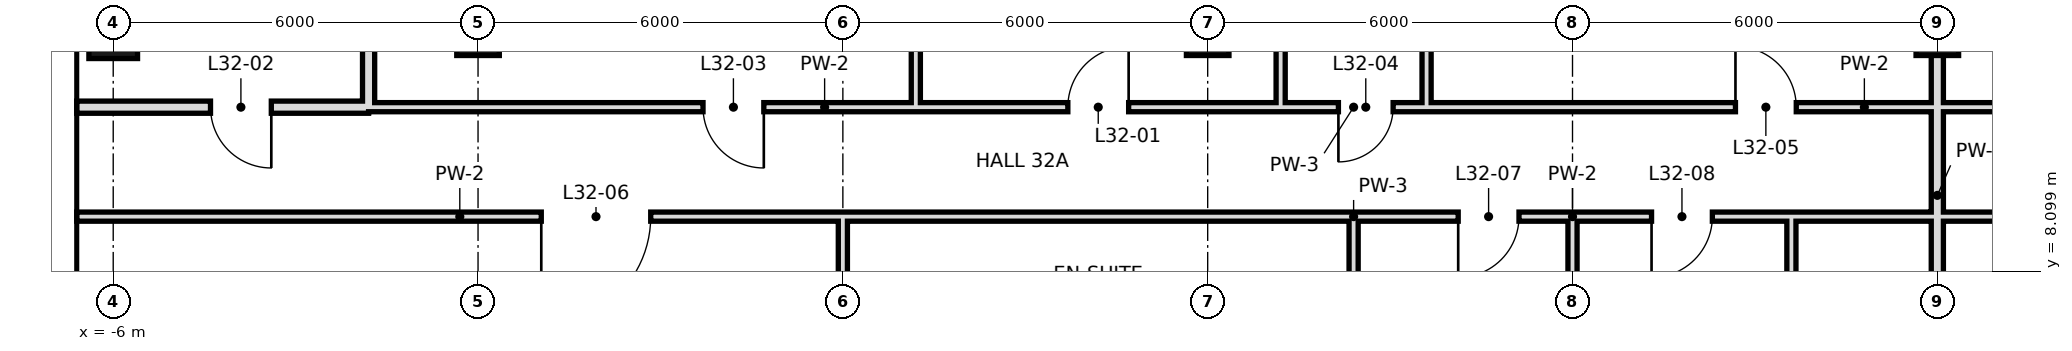
"""IFC4 building model, lengths in metres.
Left out: names, types, materials, properties, quantities, classifications, styles, units other than length and angle.
Written with IfcOpenShell. Run it as: python <this file> out.ifc"""

import sys

from ifc_helpers import new_model, si_unit, direction, frame, frame_2d, origin, origin_2d, place, context, subcontext, project, spatial, rectangle, hollow_rectangle, extrude, element, fill, save


model = new_model("IFC4")
c1 = context("Model", 3, precision=1e-05, world=origin(), true_north=direction((0.0, 1.0)))
c2 = subcontext(c1, "Body", "Model", "MODEL_VIEW")
j1 = project(units=[si_unit("LENGTHUNIT", "METRE"), si_unit("PLANEANGLEUNIT", "RADIAN")], contexts=[c1])
p1 = place(None, origin())
s1 = spatial("IfcSite", under=j1, at=p1, CompositionType="ELEMENT")
p2 = place(p1, origin())
s2 = spatial("IfcBuilding", under=s1, at=p2, CompositionType="ELEMENT")
p3 = place(p2, frame((0.0, 0.0, 143.8)))
s3 = spatial("IfcBuildingStorey", under=s2, at=p3, CompositionType="ELEMENT", Elevation=143.8)
p4 = place(p3, frame((-6.0, 12.0, 0.0), z_axis=(0.0, 0.0, 1.0), x_axis=(1.0, 0.0, 0.0)))
e1 = element("IfcColumn", 1, at=p4, inside=s3, PredefinedType="COLUMN", context=c2, shape_type="SweptSolid", body=[
    extrude(hollow_rectangle(XDim=0.8, YDim=0.8, WallThickness=0.04, at=origin_2d()), origin(), (0.0, 0.0, 1.0), 3.6),
])
for number, where, z_axis, x_axis in (
    (2, (0.0, 12.0, 0.0), (0.0, 0.0, 1.0), (1.0, 0.0, 0.0)),
    (3, (12.0, 12.0, 0.0), (0.0, 0.0, 1.0), (1.0, 0.0, 0.0)),
    (4, (24.0, 12.0, 0.0), (0.0, 0.0, 1.0), (1.0, 0.0, 0.0)),
):
    element("IfcColumn", number, at=place(p3, frame(where, z_axis=z_axis, x_axis=x_axis)), inside=s3, PredefinedType="COLUMN", context=c2, shape_type="SweptSolid", body=[
        extrude(hollow_rectangle(XDim=0.7, YDim=0.7, WallThickness=0.036, at=origin_2d()), origin(), (0.0, 0.0, 1.0), 3.6),
    ])
p5 = place(p3, frame((-1.8, 10.8, 0.0), z_axis=(0.0, 0.0, 1.0), x_axis=(0.0, 1.0, 0.0)))
e5 = element("IfcWall", 5, at=p5, inside=s3, PredefinedType="SOLIDWALL", context=c2, shape_type="SweptSolid", body=[
    extrude(rectangle(XDim=7.2, YDim=0.2, at=frame_2d((3.6, 0.0))), origin(), (0.0, 0.0, 1.0), 3.42),
])
p6 = place(p3, frame((13.2, 10.8, 0.0), z_axis=(0.0, 0.0, 1.0), x_axis=(0.0, 1.0, 0.0)))
e6 = element("IfcWall", 6, at=p6, inside=s3, PredefinedType="PARTITIONING", context=c2, shape_type="SweptSolid", body=[
    extrude(rectangle(XDim=7.9, YDim=0.15, at=frame_2d((3.95, 0.0))), origin(), (0.0, 0.0, 1.0), 3.42),
])
p7 = place(p3, frame((14.4, 6.0, 0.0), z_axis=(0.0, 0.0, 1.0), x_axis=(0.0, 1.0, 0.0)))
e7 = element("IfcWall", 7, at=p7, inside=s3, PredefinedType="PARTITIONING", context=c2, shape_type="SweptSolid", body=[
    extrude(rectangle(XDim=3.0, YDim=0.15, at=frame_2d((1.5, 0.0))), origin(), (0.0, 0.0, 1.0), 3.42),
])
p8 = place(p3, frame((15.6, 10.8, 0.0), z_axis=(0.0, 0.0, 1.0), x_axis=(0.0, 1.0, 0.0)))
e8 = element("IfcWall", 8, at=p8, inside=s3, PredefinedType="PARTITIONING", context=c2, shape_type="SweptSolid", body=[
    extrude(rectangle(XDim=7.9, YDim=0.15, at=frame_2d((3.95, 0.0))), origin(), (0.0, 0.0, 1.0), 3.42),
])
p9 = place(p3, frame((18.0, -0.6, 0.0), z_axis=(0.0, 0.0, 1.0), x_axis=(0.0, 1.0, 0.0)))
e9 = element("IfcWall", 9, at=p9, inside=s3, PredefinedType="PARTITIONING", context=c2, shape_type="SweptSolid", body=[
    extrude(rectangle(XDim=9.6, YDim=0.15, at=frame_2d((4.8, 0.0))), origin(), (0.0, 0.0, 1.0), 2.72),
])
p10 = place(p3, frame((21.6, 6.0, 0.0), z_axis=(0.0, 0.0, 1.0), x_axis=(0.0, 1.0, 0.0)))
e10 = element("IfcWall", 10, at=p10, inside=s3, PredefinedType="PARTITIONING", context=c2, shape_type="SweptSolid", body=[
    extrude(rectangle(XDim=3.0, YDim=0.15, at=frame_2d((1.5, 0.0))), origin(), (0.0, 0.0, 1.0), 3.42),
])
p11 = place(p3, frame((24.0, 0.0, 0.0), z_axis=(0.0, 0.0, 1.0), x_axis=(0.0, 1.0, 0.0)))
e11 = element("IfcWall", 11, at=p11, inside=s3, PredefinedType="SOLIDWALL", context=c2, shape_type="SweptSolid", body=[
    extrude(rectangle(XDim=18.7, YDim=0.2, at=frame_2d((9.35, 0.0))), origin(), (0.0, 0.0, 1.0), 2.72),
])
p12 = place(p3, frame((6.0, 6.0, 0.0), z_axis=(0.0, 0.0, 1.0), x_axis=(0.0, 1.0, 0.0)))
e12 = element("IfcWall", 12, at=p12, inside=s3, PredefinedType="PARTITIONING", context=c2, shape_type="SweptSolid", body=[
    extrude(rectangle(XDim=3.0, YDim=0.15, at=frame_2d((1.5, 0.0))), origin(), (0.0, 0.0, 1.0), 2.72),
])
p13 = place(p3, frame((7.2, 10.8, 0.0), z_axis=(0.0, 0.0, 1.0), x_axis=(0.0, 1.0, 0.0)))
e13 = element("IfcWall", 13, at=p13, inside=s3, PredefinedType="PARTITIONING", context=c2, shape_type="SweptSolid", body=[
    extrude(rectangle(XDim=7.9, YDim=0.15, at=frame_2d((3.95, 0.0))), origin(), (0.0, 0.0, 1.0), 3.42),
])
p14 = place(p3, frame((-6.6, 10.8, 0.0), z_axis=(0.0, 0.0, 1.0), x_axis=(1.0, 0.0, 0.0)))
e14 = element("IfcWall", 14, at=p14, inside=s3, PredefinedType="SOLIDWALL", context=c2, shape_type="SweptSolid", body=[
    extrude(rectangle(XDim=4.8, YDim=0.2, at=frame_2d((2.4, 0.0))), origin(), (0.0, 0.0, 1.0), 2.97),
])
p15 = place(p14, frame((2.2, 0.0, 0.0)))
e15 = element("IfcOpeningElement", 15, at=p15, cuts=e14, PredefinedType="OPENING", context=c2, shape_type="SweptSolid", body=[
    extrude(rectangle(XDim=1.0, YDim=2.4, at=frame_2d((0.5, 1.2))), frame((0.0, 0.11, 0.0), z_axis=(0.0, -1.0, 0.0), x_axis=(1.0, 0.0, 0.0)), (0.0, 0.0, 1.0), 0.22),
])
p16 = place(p3, frame((-1.8, 10.8, 0.0), z_axis=(0.0, 0.0, 1.0), x_axis=(1.0, 0.0, 0.0)))
e16 = element("IfcWall", 16, at=p16, inside=s3, PredefinedType="PARTITIONING", context=c2, shape_type="SweptSolid", body=[
    extrude(rectangle(XDim=15.0, YDim=0.15, at=frame_2d((7.5, 0.0))), origin(), (0.0, 0.0, 1.0), 3.42),
])
p17 = place(p16, frame((11.5, 0.0, 0.0)))
e17 = element("IfcOpeningElement", 17, at=p17, cuts=e16, PredefinedType="OPENING", context=c2, shape_type="SweptSolid", body=[
    extrude(rectangle(XDim=1.0, YDim=2.4, at=frame_2d((0.5, 1.2))), frame((0.0, 0.085, 0.0), z_axis=(0.0, -1.0, 0.0), x_axis=(1.0, 0.0, 0.0)), (0.0, 0.0, 1.0), 0.17),
])
p18 = place(p16, frame((5.5, 0.0, 0.0)))
e18 = element("IfcOpeningElement", 18, at=p18, cuts=e16, PredefinedType="OPENING", context=c2, shape_type="SweptSolid", body=[
    extrude(rectangle(XDim=1.0, YDim=2.4, at=frame_2d((0.5, 1.2))), frame((0.0, 0.085, 0.0), z_axis=(0.0, -1.0, 0.0), x_axis=(1.0, 0.0, 0.0)), (0.0, 0.0, 1.0), 0.17),
])
p19 = place(p3, frame((15.6, 10.8, 0.0), z_axis=(0.0, 0.0, 1.0), x_axis=(1.0, 0.0, 0.0)))
e19 = element("IfcWall", 19, at=p19, inside=s3, PredefinedType="PARTITIONING", context=c2, shape_type="SweptSolid", body=[
    extrude(rectangle(XDim=14.4, YDim=0.15, at=frame_2d((7.2, 0.0))), origin(), (0.0, 0.0, 1.0), 3.42),
])
p20 = place(p19, frame((5.08, 0.0, 0.0)))
e20 = element("IfcOpeningElement", 20, at=p20, cuts=e19, PredefinedType="OPENING", context=c2, shape_type="SweptSolid", body=[
    extrude(rectangle(XDim=1.0, YDim=2.4, at=frame_2d((0.5, 1.2))), frame((0.0, 0.085, 0.0), z_axis=(0.0, -1.0, 0.0), x_axis=(1.0, 0.0, 0.0)), (0.0, 0.0, 1.0), 0.17),
])
p21 = place(p19, frame((10.9, 0.0, 0.0)))
e21 = element("IfcOpeningElement", 21, at=p21, cuts=e19, PredefinedType="OPENING", context=c2, shape_type="SweptSolid", body=[
    extrude(rectangle(XDim=1.0, YDim=2.4, at=frame_2d((0.5, 1.2))), frame((0.0, 0.085, 0.0), z_axis=(0.0, -1.0, 0.0), x_axis=(1.0, 0.0, 0.0)), (0.0, 0.0, 1.0), 0.17),
])
p22 = place(p3, frame((13.2, 10.8, 0.0), z_axis=(0.0, 0.0, 1.0), x_axis=(1.0, 0.0, 0.0)))
e22 = element("IfcWall", 22, at=p22, inside=s3, PredefinedType="PARTITIONING", context=c2, shape_type="SweptSolid", body=[
    extrude(rectangle(XDim=2.4, YDim=0.15, at=frame_2d((1.2, 0.0))), origin(), (0.0, 0.0, 1.0), 3.42),
])
p23 = place(p22, frame((0.95, 0.0, 0.0)))
e23 = element("IfcOpeningElement", 23, at=p23, cuts=e22, PredefinedType="OPENING", context=c2, shape_type="SweptSolid", body=[
    extrude(rectangle(XDim=0.9, YDim=2.4, at=frame_2d((0.45, 1.2))), frame((0.0, 0.085, 0.0), z_axis=(0.0, -1.0, 0.0), x_axis=(1.0, 0.0, 0.0)), (0.0, 0.0, 1.0), 0.17),
])
p24 = place(p3, frame((-6.6, 9.0, 0.0), z_axis=(0.0, 0.0, 1.0), x_axis=(1.0, 0.0, 0.0)))
e24 = element("IfcWall", 24, at=p24, inside=s3, PredefinedType="PARTITIONING", context=c2, shape_type="SweptSolid", body=[
    extrude(rectangle(XDim=12.6, YDim=0.15, at=frame_2d((6.3, 0.0))), origin(), (0.0, 0.0, 1.0), 3.42),
])
p25 = place(p24, frame((7.64, 0.0, 0.0)))
e25 = element("IfcOpeningElement", 25, at=p25, cuts=e24, PredefinedType="OPENING", context=c2, shape_type="SweptSolid", body=[
    extrude(rectangle(XDim=1.8, YDim=2.4, at=frame_2d((0.9, 1.2))), frame((0.0, 0.085, 0.0), z_axis=(0.0, -1.0, 0.0), x_axis=(1.0, 0.0, 0.0)), (0.0, 0.0, 1.0), 0.17),
])
p26 = place(p3, frame((14.4, 9.0, 0.0), z_axis=(0.0, 0.0, 1.0), x_axis=(1.0, 0.0, 0.0)))
e26 = element("IfcWall", 26, at=p26, inside=s3, PredefinedType="PARTITIONING", context=c2, shape_type="SweptSolid", body=[
    extrude(rectangle(XDim=7.2, YDim=0.15, at=frame_2d((3.6, 0.0))), origin(), (0.0, 0.0, 1.0), 3.42),
])
p27 = place(p26, frame((1.72, 0.0, 0.0)))
e27 = element("IfcOpeningElement", 27, at=p27, cuts=e26, PredefinedType="OPENING", context=c2, shape_type="SweptSolid", body=[
    extrude(rectangle(XDim=1.0, YDim=2.4, at=frame_2d((0.5, 1.2))), frame((0.0, 0.085, 0.0), z_axis=(0.0, -1.0, 0.0), x_axis=(1.0, 0.0, 0.0)), (0.0, 0.0, 1.0), 0.17),
])
p28 = place(p26, frame((4.9, 0.0, 0.0)))
e28 = element("IfcOpeningElement", 28, at=p28, cuts=e26, PredefinedType="OPENING", context=c2, shape_type="SweptSolid", body=[
    extrude(rectangle(XDim=1.0, YDim=2.4, at=frame_2d((0.5, 1.2))), frame((0.0, 0.085, 0.0), z_axis=(0.0, -1.0, 0.0), x_axis=(1.0, 0.0, 0.0)), (0.0, 0.0, 1.0), 0.17),
])
p29 = place(p3, frame((24.0, 9.0, 0.0), z_axis=(0.0, 0.0, 1.0), x_axis=(1.0, 0.0, 0.0)))
e29 = element("IfcWall", 29, at=p29, inside=s3, PredefinedType="PARTITIONING", context=c2, shape_type="SweptSolid", body=[
    extrude(rectangle(XDim=27.6, YDim=0.15, at=frame_2d((13.8, 0.0))), origin(), (0.0, 0.0, 1.0), 3.42),
])
p30 = place(p29, frame((3.16, 0.0, 0.0)))
e30 = element("IfcOpeningElement", 30, at=p30, cuts=e29, PredefinedType="OPENING", context=c2, shape_type="SweptSolid", body=[
    extrude(rectangle(XDim=1.8, YDim=2.4, at=frame_2d((0.9, 1.2))), frame((0.0, 0.085, 0.0), z_axis=(0.0, -1.0, 0.0), x_axis=(1.0, 0.0, 0.0)), (0.0, 0.0, 1.0), 0.17),
])
p31 = place(p29, frame((13.6, 0.0, 0.0)))
e31 = element("IfcOpeningElement", 31, at=p31, cuts=e29, PredefinedType="OPENING", context=c2, shape_type="SweptSolid", body=[
    extrude(rectangle(XDim=1.0, YDim=2.4, at=frame_2d((0.5, 1.2))), frame((0.0, 0.085, 0.0), z_axis=(0.0, -1.0, 0.0), x_axis=(1.0, 0.0, 0.0)), (0.0, 0.0, 1.0), 0.17),
])
p32 = place(p29, frame((21.4, 0.0, 0.0)))
e32 = element("IfcOpeningElement", 32, at=p32, cuts=e29, PredefinedType="OPENING", context=c2, shape_type="SweptSolid", body=[
    extrude(rectangle(XDim=1.0, YDim=2.4, at=frame_2d((0.5, 1.2))), frame((0.0, 0.085, 0.0), z_axis=(0.0, -1.0, 0.0), x_axis=(1.0, 0.0, 0.0)), (0.0, 0.0, 1.0), 0.17),
])
p33 = place(p29, frame((24.88, 0.0, 0.0)))
e33 = element("IfcOpeningElement", 33, at=p33, cuts=e29, PredefinedType="OPENING", context=c2, shape_type="SweptSolid", body=[
    extrude(rectangle(XDim=1.0, YDim=2.4, at=frame_2d((0.5, 1.2))), frame((0.0, 0.085, 0.0), z_axis=(0.0, -1.0, 0.0), x_axis=(1.0, 0.0, 0.0)), (0.0, 0.0, 1.0), 0.17),
])
p34 = place(p3, frame((6.0, 9.0, 0.0), z_axis=(0.0, 0.0, 1.0), x_axis=(1.0, 0.0, 0.0)))
e34 = element("IfcWall", 34, at=p34, inside=s3, PredefinedType="PARTITIONING", context=c2, shape_type="SweptSolid", body=[
    extrude(rectangle(XDim=8.4, YDim=0.15, at=frame_2d((4.2, 0.0))), origin(), (0.0, 0.0, 1.0), 3.42),
])
p35 = place(p3, frame((21.6, 9.0, 0.0), z_axis=(0.0, 0.0, 1.0), x_axis=(1.0, 0.0, 0.0)))
e35 = element("IfcWall", 35, at=p35, inside=s3, PredefinedType="PARTITIONING", context=c2, shape_type="SweptSolid", body=[
    extrude(rectangle(XDim=2.4, YDim=0.15, at=frame_2d((1.2, 0.0))), origin(), (0.0, 0.0, 1.0), 3.42),
])
p36 = place(p17, frame((1.0, 0.0, 0.0), z_axis=(0.0, 0.0, 1.0), x_axis=(-1.0, 0.0, 0.0)))
e36 = element("IfcDoor", 36, at=p36, inside=s3, OperationType="SINGLE_SWING_LEFT", PredefinedType="DOOR", context=c2, shape_type="SweptSolid", body=[
    extrude(rectangle(XDim=1.0, YDim=2.4, at=frame_2d((0.5, 1.2))), frame((0.0, 0.025, 0.0), z_axis=(0.0, -1.0, 0.0), x_axis=(1.0, 0.0, 0.0)), (0.0, 0.0, 1.0), 0.05),
])
fill(e17, e36)
p37 = place(p15, origin())
e37 = element("IfcDoor", 37, at=p37, inside=s3, OperationType="SINGLE_SWING_RIGHT", PredefinedType="DOOR", context=c2, shape_type="SweptSolid", body=[
    extrude(rectangle(XDim=1.0, YDim=2.4, at=frame_2d((0.5, 1.2))), frame((0.0, 0.025, 0.0), z_axis=(0.0, -1.0, 0.0), x_axis=(1.0, 0.0, 0.0)), (0.0, 0.0, 1.0), 0.05),
])
fill(e15, e37)
p38 = place(p18, origin())
e38 = element("IfcDoor", 38, at=p38, inside=s3, OperationType="SINGLE_SWING_RIGHT", PredefinedType="DOOR", context=c2, shape_type="SweptSolid", body=[
    extrude(rectangle(XDim=1.0, YDim=2.4, at=frame_2d((0.5, 1.2))), frame((0.0, 0.025, 0.0), z_axis=(0.0, -1.0, 0.0), x_axis=(1.0, 0.0, 0.0)), (0.0, 0.0, 1.0), 0.05),
])
fill(e18, e38)
p39 = place(p23, frame((0.9, 0.0, 0.0), z_axis=(0.0, 0.0, 1.0), x_axis=(-1.0, 0.0, 0.0)))
e39 = element("IfcDoor", 39, at=p39, inside=s3, OperationType="SINGLE_SWING_RIGHT", PredefinedType="DOOR", context=c2, shape_type="SweptSolid", body=[
    extrude(rectangle(XDim=0.9, YDim=2.4, at=frame_2d((0.45, 1.2))), frame((0.0, 0.025, 0.0), z_axis=(0.0, -1.0, 0.0), x_axis=(1.0, 0.0, 0.0)), (0.0, 0.0, 1.0), 0.05),
])
fill(e23, e39)
p40 = place(p20, origin())
e40 = element("IfcDoor", 40, at=p40, inside=s3, OperationType="SINGLE_SWING_LEFT", PredefinedType="DOOR", context=c2, shape_type="SweptSolid", body=[
    extrude(rectangle(XDim=1.0, YDim=2.4, at=frame_2d((0.5, 1.2))), frame((0.0, 0.025, 0.0), z_axis=(0.0, -1.0, 0.0), x_axis=(1.0, 0.0, 0.0)), (0.0, 0.0, 1.0), 0.05),
])
fill(e20, e40)
p41 = place(p25, frame((1.8, 0.0, 0.0), z_axis=(0.0, 0.0, 1.0), x_axis=(-1.0, 0.0, 0.0)))
e41 = element("IfcDoor", 41, at=p41, inside=s3, OperationType="SINGLE_SWING_RIGHT", PredefinedType="DOOR", context=c2, shape_type="SweptSolid", body=[
    extrude(rectangle(XDim=1.8, YDim=2.4, at=frame_2d((0.9, 1.2))), frame((0.0, 0.025, 0.0), z_axis=(0.0, -1.0, 0.0), x_axis=(1.0, 0.0, 0.0)), (0.0, 0.0, 1.0), 0.05),
])
fill(e25, e41)
p42 = place(p27, frame((1.0, 0.0, 0.0), z_axis=(0.0, 0.0, 1.0), x_axis=(-1.0, 0.0, 0.0)))
e42 = element("IfcDoor", 42, at=p42, inside=s3, OperationType="SINGLE_SWING_RIGHT", PredefinedType="DOOR", context=c2, shape_type="SweptSolid", body=[
    extrude(rectangle(XDim=1.0, YDim=2.4, at=frame_2d((0.5, 1.2))), frame((0.0, 0.025, 0.0), z_axis=(0.0, -1.0, 0.0), x_axis=(1.0, 0.0, 0.0)), (0.0, 0.0, 1.0), 0.05),
])
fill(e27, e42)
p43 = place(p28, frame((1.0, 0.0, 0.0), z_axis=(0.0, 0.0, 1.0), x_axis=(-1.0, 0.0, 0.0)))
e43 = element("IfcDoor", 43, at=p43, inside=s3, OperationType="SINGLE_SWING_RIGHT", PredefinedType="DOOR", context=c2, shape_type="SweptSolid", body=[
    extrude(rectangle(XDim=1.0, YDim=2.4, at=frame_2d((0.5, 1.2))), frame((0.0, 0.025, 0.0), z_axis=(0.0, -1.0, 0.0), x_axis=(1.0, 0.0, 0.0)), (0.0, 0.0, 1.0), 0.05),
])
fill(e28, e43)
save(model, sys.argv[1])
